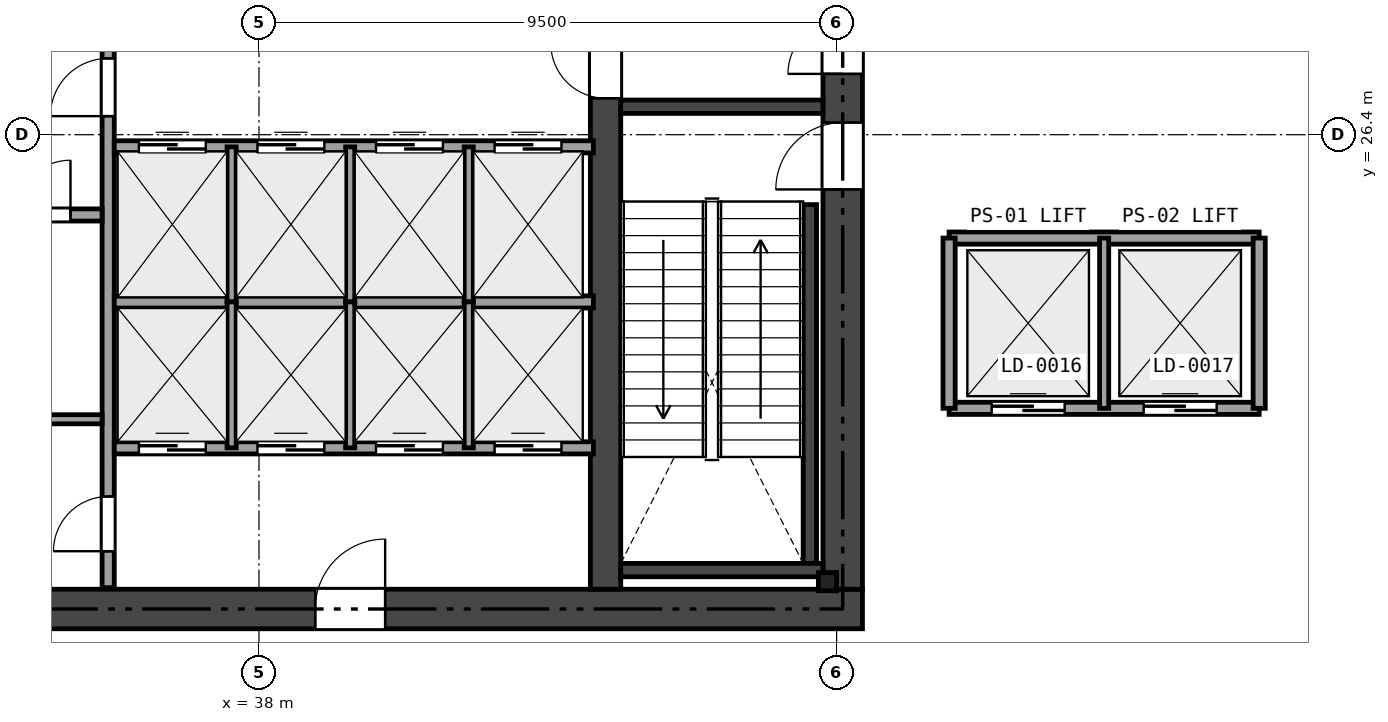
"""IFC4 building model, lengths in metres.
Left out: names, types, materials, properties, quantities, classifications, styles, units other than length and angle.
Written with IfcOpenShell. Run it as: python <this file> out.ifc"""

import sys

from ifc_helpers import new_model, si_unit, direction, frame, frame_2d, origin, origin_2d, place, context, subcontext, project, spatial, rectangle, i_section, extrude, element, fill, save


model = new_model("IFC4")
c1 = context("Model", 3, precision=1e-05, world=origin(), true_north=direction((0.0, 1.0)))
c2 = subcontext(c1, "Body", "Model", "MODEL_VIEW")
j1 = project(units=[si_unit("LENGTHUNIT", "METRE"), si_unit("PLANEANGLEUNIT", "RADIAN")], contexts=[c1])
p1 = place(None, origin())
s1 = spatial("IfcSite", under=j1, at=p1, CompositionType="ELEMENT")
p2 = place(p1, origin())
s2 = spatial("IfcBuilding", under=s1, at=p2, CompositionType="ELEMENT")
p3 = place(p2, origin())
s3 = spatial("IfcBuildingStorey", under=s2, at=p3, CompositionType="ELEMENT", Elevation=0.0)
p4 = place(p3, frame((26.475, 18.6, 0.0), z_axis=(0.0, 0.0, 1.0), x_axis=(1.0, 0.0, 0.0)))
e1 = element("IfcWall", 1, at=p4, inside=s3, PredefinedType="SHEAR", context=c2, shape_type="SweptSolid", body=[
    extrude(rectangle(XDim=21.45, YDim=0.65, at=frame_2d((10.725, 0.0))), origin(), (0.0, 0.0, 1.0), 5.05),
])
p5 = place(p4, frame((12.45, 0.0, 0.0)))
e2 = element("IfcOpeningElement", 2, at=p5, cuts=e1, PredefinedType="OPENING", context=c2, shape_type="SweptSolid", body=[
    extrude(rectangle(XDim=1.15, YDim=2.15, at=frame_2d((0.575, 1.075))), frame((0.0, 0.335, 0.0), z_axis=(0.0, -1.0, 0.0), x_axis=(1.0, 0.0, 0.0)), (0.0, 0.0, 1.0), 0.67),
])
p6 = place(p4, frame((5.275, 0.0, 0.0)))
e3 = element("IfcOpeningElement", 3, at=p6, cuts=e1, PredefinedType="OPENING", context=c2, shape_type="SweptSolid", body=[
    extrude(rectangle(XDim=0.9, YDim=2.1, at=frame_2d((0.45, 1.05))), frame((0.0, 0.335, 0.0), z_axis=(0.0, -1.0, 0.0), x_axis=(1.0, 0.0, 0.0)), (0.0, 0.0, 1.0), 0.67),
])
p7 = place(p3, frame((47.6, 18.925, 0.0), z_axis=(0.0, 0.0, 1.0), x_axis=(0.0, 1.0, 0.0)))
e4 = element("IfcWall", 4, at=p7, inside=s3, PredefinedType="SHEAR", context=c2, shape_type="SweptSolid", body=[
    extrude(rectangle(XDim=14.95, YDim=0.65, at=frame_2d((7.475, 0.0))), origin(), (0.0, 0.0, 1.0), 5.05),
])
p8 = place(p7, frame((6.575, 0.0, 0.0)))
e5 = element("IfcOpeningElement", 5, at=p8, cuts=e4, PredefinedType="OPENING", context=c2, shape_type="SweptSolid", body=[
    extrude(rectangle(XDim=1.1, YDim=2.15, at=frame_2d((0.55, 1.075))), frame((0.0, 0.335, 0.0), z_axis=(0.0, -1.0, 0.0), x_axis=(1.0, 0.0, 0.0)), (0.0, 0.0, 1.0), 0.67),
])
p9 = place(p7, frame((8.475, 0.0, 0.0)))
e6 = element("IfcOpeningElement", 6, at=p9, cuts=e4, PredefinedType="OPENING", context=c2, shape_type="SweptSolid", body=[
    extrude(rectangle(XDim=0.9, YDim=2.1, at=frame_2d((0.45, 1.05))), frame((0.0, 0.335, 0.0), z_axis=(0.0, -1.0, 0.0), x_axis=(1.0, 0.0, 0.0)), (0.0, 0.0, 1.0), 0.67),
])
p10 = place(p7, frame((13.125, 0.0, 0.0)))
e7 = element("IfcOpeningElement", 7, at=p10, cuts=e4, PredefinedType="OPENING", context=c2, shape_type="SweptSolid", body=[
    extrude(rectangle(XDim=0.9, YDim=2.1, at=frame_2d((0.45, 1.05))), frame((0.0, 0.335, 0.0), z_axis=(0.0, -1.0, 0.0), x_axis=(1.0, 0.0, 0.0)), (0.0, 0.0, 1.0), 0.67),
])
p11 = place(p3, frame((43.7, 18.925, 0.0), z_axis=(0.0, 0.0, 1.0), x_axis=(0.0, 1.0, 0.0)))
e8 = element("IfcWall", 8, at=p11, inside=s3, PredefinedType="SHEAR", context=c2, shape_type="SweptSolid", body=[
    extrude(rectangle(XDim=14.95, YDim=0.5, at=frame_2d((7.475, 0.0))), origin(), (0.0, 0.0, 1.0), 5.05),
])
p12 = place(p11, frame((8.075, 0.0, 0.0)))
e9 = element("IfcOpeningElement", 9, at=p12, cuts=e8, PredefinedType="OPENING", context=c2, shape_type="SweptSolid", body=[
    extrude(rectangle(XDim=0.9, YDim=2.1, at=frame_2d((0.45, 1.05))), frame((0.0, 0.26, 0.0), z_axis=(0.0, -1.0, 0.0), x_axis=(1.0, 0.0, 0.0)), (0.0, 0.0, 1.0), 0.52),
])
p13 = place(p3, frame((43.95, 26.86, 0.0), z_axis=(0.0, 0.0, 1.0), x_axis=(1.0, 0.0, 0.0)))
e10 = element("IfcWall", 10, at=p13, inside=s3, PredefinedType="SHEAR", context=c2, shape_type="SweptSolid", body=[
    extrude(rectangle(XDim=3.325, YDim=0.22, at=frame_2d((1.663, 0.0))), origin(), (0.0, 0.0, 1.0), 5.05),
])
p14 = place(p3, frame((47.06, 19.35, 0.0), z_axis=(0.0, 0.0, 1.0), x_axis=(0.0, 1.0, 0.0)))
e11 = element("IfcWall", 11, at=p14, inside=s3, PredefinedType="SHEAR", context=c2, shape_type="SweptSolid", body=[
    extrude(rectangle(XDim=5.9, YDim=0.22, at=frame_2d((2.95, 0.0))), origin(), (0.0, 0.0, 1.0), 5.05),
])
p15 = place(p3, frame((43.95, 19.24, 0.0), z_axis=(0.0, 0.0, 1.0), x_axis=(1.0, 0.0, 0.0)))
e12 = element("IfcWall", 12, at=p15, inside=s3, PredefinedType="SHEAR", context=c2, shape_type="SweptSolid", body=[
    extrude(rectangle(XDim=3.325, YDim=0.22, at=frame_2d((1.663, 0.0))), origin(), (0.0, 0.0, 1.0), 5.05),
])
p16 = place(p3, frame((47.35, 19.05, 0.0), z_axis=(0.0, 0.0, 1.0), x_axis=(1.0, 0.0, 0.0)))
e13 = element("IfcColumn", 13, at=p16, inside=s3, PredefinedType="PILASTER", context=c2, shape_type="SweptSolid", body=[
    extrude(i_section(OverallWidth=0.3, OverallDepth=0.3, WebThickness=0.011, FlangeThickness=0.019, at=origin_2d()), origin(), (0.0, 0.0, 1.0), 5.05),
])
p17 = place(p3, frame((35.52, 18.95, 0.0), z_axis=(0.0, 0.0, 1.0), x_axis=(0.0, 1.0, 0.0)))
e14 = element("IfcWall", 14, at=p17, inside=s3, PredefinedType="SOLIDWALL", context=c2, shape_type="SweptSolid", body=[
    extrude(rectangle(XDim=14.9, YDim=0.2, at=frame_2d((7.45, 0.0))), origin(), (0.0, 0.0, 1.0), 4.571),
])
p18 = place(p17, frame((7.755, 0.0, 0.0)))
e15 = element("IfcOpeningElement", 15, at=p18, cuts=e14, PredefinedType="OPENING", context=c2, shape_type="SweptSolid", body=[
    extrude(rectangle(XDim=0.95, YDim=2.15, at=frame_2d((0.475, 1.075))), frame((0.0, 0.11, 0.0), z_axis=(0.0, -1.0, 0.0), x_axis=(1.0, 0.0, 0.0)), (0.0, 0.0, 1.0), 0.22),
])
p19 = place(p17, frame((0.6, 0.0, 0.0)))
e16 = element("IfcOpeningElement", 16, at=p19, cuts=e14, PredefinedType="OPENING", context=c2, shape_type="SweptSolid", body=[
    extrude(rectangle(XDim=0.9, YDim=2.1, at=frame_2d((0.45, 1.05))), frame((0.0, 0.11, 0.0), z_axis=(0.0, -1.0, 0.0), x_axis=(1.0, 0.0, 0.0)), (0.0, 0.0, 1.0), 0.22),
])
p20 = place(p3, frame((31.0, 25.08, 0.0), z_axis=(0.0, 0.0, 1.0), x_axis=(1.0, 0.0, 0.0)))
e17 = element("IfcWall", 17, at=p20, inside=s3, PredefinedType="SOLIDWALL", context=c2, shape_type="SweptSolid", body=[
    extrude(rectangle(XDim=4.42, YDim=0.2, at=frame_2d((2.21, 0.0))), origin(), (0.0, 0.0, 1.0), 5.05),
])
p21 = place(p20, frame((3.0, 0.0, 0.0)))
e18 = element("IfcOpeningElement", 18, at=p21, cuts=e17, PredefinedType="OPENING", context=c2, shape_type="SweptSolid", body=[
    extrude(rectangle(XDim=0.9, YDim=2.1, at=frame_2d((0.45, 1.05))), frame((0.0, 0.11, 0.0), z_axis=(0.0, -1.0, 0.0), x_axis=(1.0, 0.0, 0.0)), (0.0, 0.0, 1.0), 0.22),
])
p22 = place(p20, frame((0.62, 0.0, 0.0)))
e19 = element("IfcOpeningElement", 19, at=p22, cuts=e17, PredefinedType="OPENING", context=c2, shape_type="SweptSolid", body=[
    extrude(rectangle(XDim=1.2, YDim=2.15, at=frame_2d((0.6, 1.075))), frame((0.0, 0.11, 0.0), z_axis=(0.0, -1.0, 0.0), x_axis=(1.0, 0.0, 0.0)), (0.0, 0.0, 1.0), 0.22),
])
p23 = place(p3, frame((33.42, 21.72, 0.0), z_axis=(0.0, 0.0, 1.0), x_axis=(1.0, 0.0, 0.0)))
e20 = element("IfcWall", 20, at=p23, inside=s3, PredefinedType="PARTITIONING", context=c2, shape_type="SweptSolid", body=[
    extrude(rectangle(XDim=2.0, YDim=0.15, at=frame_2d((1.0, 0.0))), origin(), (0.0, 0.0, 1.0), 5.05),
])
p24 = place(p3, frame((35.62, 26.2, 0.0), z_axis=(0.0, 0.0, 1.0), x_axis=(1.0, 0.0, 0.0)))
e21 = element("IfcWall", 21, at=p24, inside=s3, PredefinedType="SOLIDWALL", context=c2, shape_type="SweptSolid", body=[
    extrude(rectangle(XDim=7.88, YDim=0.2, at=frame_2d((3.94, 0.0))), origin(), (0.0, 0.0, 1.0), 5.05),
])
p25 = place(p24, frame((0.405, 0.0, 0.0)))
e22 = element("IfcOpeningElement", 22, at=p25, cuts=e21, PredefinedType="OPENING", context=c2, shape_type="SweptSolid", body=[
    extrude(rectangle(XDim=1.1, YDim=2.15, at=frame_2d((0.55, 1.075))), frame((0.0, 0.11, 0.0), z_axis=(0.0, -1.0, 0.0), x_axis=(1.0, 0.0, 0.0)), (0.0, 0.0, 1.0), 0.22),
])
p26 = place(p24, frame((2.355, 0.0, 0.0)))
e23 = element("IfcOpeningElement", 23, at=p26, cuts=e21, PredefinedType="OPENING", context=c2, shape_type="SweptSolid", body=[
    extrude(rectangle(XDim=1.1, YDim=2.15, at=frame_2d((0.55, 1.075))), frame((0.0, 0.11, 0.0), z_axis=(0.0, -1.0, 0.0), x_axis=(1.0, 0.0, 0.0)), (0.0, 0.0, 1.0), 0.22),
])
p27 = place(p24, frame((4.305, 0.0, 0.0)))
e24 = element("IfcOpeningElement", 24, at=p27, cuts=e21, PredefinedType="OPENING", context=c2, shape_type="SweptSolid", body=[
    extrude(rectangle(XDim=1.1, YDim=2.15, at=frame_2d((0.55, 1.075))), frame((0.0, 0.11, 0.0), z_axis=(0.0, -1.0, 0.0), x_axis=(1.0, 0.0, 0.0)), (0.0, 0.0, 1.0), 0.22),
])
p28 = place(p24, frame((6.255, 0.0, 0.0)))
e25 = element("IfcOpeningElement", 25, at=p28, cuts=e21, PredefinedType="OPENING", context=c2, shape_type="SweptSolid", body=[
    extrude(rectangle(XDim=1.1, YDim=2.15, at=frame_2d((0.55, 1.075))), frame((0.0, 0.11, 0.0), z_axis=(0.0, -1.0, 0.0), x_axis=(1.0, 0.0, 0.0)), (0.0, 0.0, 1.0), 0.22),
])
p29 = place(p3, frame((35.62, 23.65, 0.0), z_axis=(0.0, 0.0, 1.0), x_axis=(1.0, 0.0, 0.0)))
e26 = element("IfcWall", 26, at=p29, inside=s3, PredefinedType="SOLIDWALL", context=c2, shape_type="SweptSolid", body=[
    extrude(rectangle(XDim=7.88, YDim=0.2, at=frame_2d((3.94, 0.0))), origin(), (0.0, 0.0, 1.0), 4.571),
])
p30 = place(p3, frame((35.62, 21.25, 0.0), z_axis=(0.0, 0.0, 1.0), x_axis=(1.0, 0.0, 0.0)))
e27 = element("IfcWall", 27, at=p30, inside=s3, PredefinedType="SOLIDWALL", context=c2, shape_type="SweptSolid", body=[
    extrude(rectangle(XDim=7.88, YDim=0.2, at=frame_2d((3.94, 0.0))), origin(), (0.0, 0.0, 1.0), 5.05),
])
p31 = place(p30, frame((0.405, 0.0, 0.0)))
e28 = element("IfcOpeningElement", 28, at=p31, cuts=e27, PredefinedType="OPENING", context=c2, shape_type="SweptSolid", body=[
    extrude(rectangle(XDim=1.1, YDim=2.15, at=frame_2d((0.55, 1.075))), frame((0.0, 0.11, 0.0), z_axis=(0.0, -1.0, 0.0), x_axis=(1.0, 0.0, 0.0)), (0.0, 0.0, 1.0), 0.22),
])
p32 = place(p30, frame((2.355, 0.0, 0.0)))
e29 = element("IfcOpeningElement", 29, at=p32, cuts=e27, PredefinedType="OPENING", context=c2, shape_type="SweptSolid", body=[
    extrude(rectangle(XDim=1.1, YDim=2.15, at=frame_2d((0.55, 1.075))), frame((0.0, 0.11, 0.0), z_axis=(0.0, -1.0, 0.0), x_axis=(1.0, 0.0, 0.0)), (0.0, 0.0, 1.0), 0.22),
])
p33 = place(p30, frame((4.305, 0.0, 0.0)))
e30 = element("IfcOpeningElement", 30, at=p33, cuts=e27, PredefinedType="OPENING", context=c2, shape_type="SweptSolid", body=[
    extrude(rectangle(XDim=1.1, YDim=2.15, at=frame_2d((0.55, 1.075))), frame((0.0, 0.11, 0.0), z_axis=(0.0, -1.0, 0.0), x_axis=(1.0, 0.0, 0.0)), (0.0, 0.0, 1.0), 0.22),
])
p34 = place(p30, frame((6.255, 0.0, 0.0)))
e31 = element("IfcOpeningElement", 31, at=p34, cuts=e27, PredefinedType="OPENING", context=c2, shape_type="SweptSolid", body=[
    extrude(rectangle(XDim=1.1, YDim=2.15, at=frame_2d((0.55, 1.075))), frame((0.0, 0.11, 0.0), z_axis=(0.0, -1.0, 0.0), x_axis=(1.0, 0.0, 0.0)), (0.0, 0.0, 1.0), 0.22),
])
for number, where, z_axis, x_axis in (
    (32, (37.55, 23.65, 0.0), (0.0, 0.0, 1.0), (0.0, 1.0, 0.0)),
    (33, (39.5, 23.65, 0.0), (0.0, 0.0, 1.0), (0.0, 1.0, 0.0)),
    (34, (41.45, 23.65, 0.0), (0.0, 0.0, 1.0), (0.0, 1.0, 0.0)),
):
    element("IfcWall", number, at=place(p3, frame(where, z_axis=z_axis, x_axis=x_axis)), inside=s3, PredefinedType="PARTITIONING", context=c2, shape_type="SweptSolid", body=[
        extrude(rectangle(XDim=2.55, YDim=0.15, at=frame_2d((1.275, 0.0))), origin(), (0.0, 0.0, 1.0), 4.571),
    ])
for number, where, z_axis, x_axis in (
    (35, (37.55, 21.25, 0.0), (0.0, 0.0, 1.0), (0.0, 1.0, 0.0)),
    (36, (39.5, 21.25, 0.0), (0.0, 0.0, 1.0), (0.0, 1.0, 0.0)),
    (37, (41.45, 21.25, 0.0), (0.0, 0.0, 1.0), (0.0, 1.0, 0.0)),
):
    element("IfcWall", number, at=place(p3, frame(where, z_axis=z_axis, x_axis=x_axis)), inside=s3, PredefinedType="PARTITIONING", context=c2, shape_type="SweptSolid", body=[
        extrude(rectangle(XDim=2.4, YDim=0.15, at=frame_2d((1.2, 0.0))), origin(), (0.0, 0.0, 1.0), 4.571),
    ])
p35 = place(p3, frame((49.35, 24.7, 0.0), z_axis=(0.0, 0.0, 1.0), x_axis=(1.0, 0.0, 0.0)))
e38 = element("IfcWall", 38, at=p35, inside=s3, PredefinedType="SOLIDWALL", context=c2, shape_type="SweptSolid", body=[
    extrude(rectangle(XDim=5.1, YDim=0.2, at=frame_2d((2.55, 0.0))), origin(), (0.0, 0.0, 1.0), 5.05),
])
p36 = place(p3, frame((49.35, 21.9, 0.0), z_axis=(0.0, 0.0, 1.0), x_axis=(1.0, 0.0, 0.0)))
e39 = element("IfcWall", 39, at=p36, inside=s3, PredefinedType="SOLIDWALL", context=c2, shape_type="SweptSolid", body=[
    extrude(rectangle(XDim=5.1, YDim=0.2, at=frame_2d((2.55, 0.0))), origin(), (0.0, 0.0, 1.0), 5.05),
])
p37 = place(p36, frame((0.7, 0.0, 0.0)))
e40 = element("IfcOpeningElement", 40, at=p37, cuts=e39, PredefinedType="OPENING", context=c2, shape_type="SweptSolid", body=[
    extrude(rectangle(XDim=1.2, YDim=2.15, at=frame_2d((0.6, 1.075))), frame((0.0, 0.11, 0.0), z_axis=(0.0, -1.0, 0.0), x_axis=(1.0, 0.0, 0.0)), (0.0, 0.0, 1.0), 0.22),
])
p38 = place(p36, frame((3.2, 0.0, 0.0)))
e41 = element("IfcOpeningElement", 41, at=p38, cuts=e39, PredefinedType="OPENING", context=c2, shape_type="SweptSolid", body=[
    extrude(rectangle(XDim=1.2, YDim=2.15, at=frame_2d((0.6, 1.075))), frame((0.0, 0.11, 0.0), z_axis=(0.0, -1.0, 0.0), x_axis=(1.0, 0.0, 0.0)), (0.0, 0.0, 1.0), 0.22),
])
for number, where, z_axis, x_axis in (
    (42, (49.35, 21.9, 0.0), (0.0, 0.0, 1.0), (0.0, 1.0, 0.0)),
    (43, (54.45, 21.9, 0.0), (0.0, 0.0, 1.0), (0.0, 1.0, 0.0)),
):
    element("IfcWall", number, at=place(p3, frame(where, z_axis=z_axis, x_axis=x_axis)), inside=s3, PredefinedType="SOLIDWALL", context=c2, shape_type="SweptSolid", body=[
        extrude(rectangle(XDim=2.8, YDim=0.2, at=frame_2d((1.4, 0.0))), origin(), (0.0, 0.0, 1.0), 5.05),
    ])
p39 = place(p3, frame((51.9, 21.9, 0.0), z_axis=(0.0, 0.0, 1.0), x_axis=(0.0, 1.0, 0.0)))
e44 = element("IfcWall", 44, at=p39, inside=s3, PredefinedType="PARTITIONING", context=c2, shape_type="SweptSolid", body=[
    extrude(rectangle(XDim=2.8, YDim=0.15, at=frame_2d((1.4, 0.0))), origin(), (0.0, 0.0, 1.0), 5.05),
])
p40 = place(p8, origin())
e45 = element("IfcDoor", 45, at=p40, inside=s3, OperationType="SINGLE_SWING_LEFT", PredefinedType="DOOR", context=c2, shape_type="SweptSolid", body=[
    extrude(rectangle(XDim=1.1, YDim=2.15, at=frame_2d((0.55, 1.075))), frame((0.0, 0.025, 0.0), z_axis=(0.0, -1.0, 0.0), x_axis=(1.0, 0.0, 0.0)), (0.0, 0.0, 1.0), 0.05),
])
fill(e5, e45)
p41 = place(p18, origin())
e46 = element("IfcDoor", 46, at=p41, inside=s3, OperationType="SINGLE_SWING_LEFT", PredefinedType="DOOR", context=c2, shape_type="SweptSolid", body=[
    extrude(rectangle(XDim=0.95, YDim=2.15, at=frame_2d((0.475, 1.075))), frame((0.0, 0.025, 0.0), z_axis=(0.0, -1.0, 0.0), x_axis=(1.0, 0.0, 0.0)), (0.0, 0.0, 1.0), 0.05),
])
fill(e15, e46)
p42 = place(p12, origin())
e47 = element("IfcDoor", 47, at=p42, inside=s3, OperationType="SINGLE_SWING_RIGHT", PredefinedType="DOOR", context=c2, shape_type="SweptSolid", body=[
    extrude(rectangle(XDim=0.9, YDim=2.1, at=frame_2d((0.45, 1.05))), frame((0.0, 0.025, 0.0), z_axis=(0.0, -1.0, 0.0), x_axis=(1.0, 0.0, 0.0)), (0.0, 0.0, 1.0), 0.05),
])
fill(e9, e47)
p43 = place(p9, origin())
e48 = element("IfcDoor", 48, at=p43, inside=s3, OperationType="SINGLE_SWING_LEFT", PredefinedType="DOOR", context=c2, shape_type="SweptSolid", body=[
    extrude(rectangle(XDim=0.9, YDim=2.1, at=frame_2d((0.45, 1.05))), frame((0.0, 0.025, 0.0), z_axis=(0.0, -1.0, 0.0), x_axis=(1.0, 0.0, 0.0)), (0.0, 0.0, 1.0), 0.05),
])
fill(e6, e48)
p44 = place(p5, origin())
e49 = element("IfcDoor", 49, at=p44, inside=s3, OperationType="SINGLE_SWING_RIGHT", PredefinedType="DOOR", context=c2, shape_type="SweptSolid", body=[
    extrude(rectangle(XDim=1.15, YDim=2.15, at=frame_2d((0.575, 1.075))), frame((0.0, 0.025, 0.0), z_axis=(0.0, -1.0, 0.0), x_axis=(1.0, 0.0, 0.0)), (0.0, 0.0, 1.0), 0.05),
])
fill(e2, e49)
p45 = place(p19, origin())
e50 = element("IfcDoor", 50, at=p45, inside=s3, OperationType="SINGLE_SWING_LEFT", PredefinedType="DOOR", context=c2, shape_type="SweptSolid", body=[
    extrude(rectangle(XDim=0.9, YDim=2.1, at=frame_2d((0.45, 1.05))), frame((0.0, 0.025, 0.0), z_axis=(0.0, -1.0, 0.0), x_axis=(1.0, 0.0, 0.0)), (0.0, 0.0, 1.0), 0.05),
])
fill(e16, e50)
p46 = place(p21, origin())
e51 = element("IfcDoor", 51, at=p46, inside=s3, OperationType="SINGLE_SWING_RIGHT", PredefinedType="DOOR", context=c2, shape_type="SweptSolid", body=[
    extrude(rectangle(XDim=0.9, YDim=2.1, at=frame_2d((0.45, 1.05))), frame((0.0, 0.025, 0.0), z_axis=(0.0, -1.0, 0.0), x_axis=(1.0, 0.0, 0.0)), (0.0, 0.0, 1.0), 0.05),
])
fill(e18, e51)
p47 = place(p31, origin())
e52 = element("IfcDoor", 52, at=p47, inside=s3, OperationType="SLIDING_TO_LEFT", PredefinedType="DOOR", context=c2, shape_type="SweptSolid", body=[
    extrude(rectangle(XDim=1.1, YDim=2.15, at=frame_2d((0.55, 1.075))), frame((0.0, 0.025, 0.0), z_axis=(0.0, -1.0, 0.0), x_axis=(1.0, 0.0, 0.0)), (0.0, 0.0, 1.0), 0.05),
])
fill(e28, e52)
p48 = place(p25, origin())
e53 = element("IfcDoor", 53, at=p48, inside=s3, OperationType="SLIDING_TO_LEFT", PredefinedType="DOOR", context=c2, shape_type="SweptSolid", body=[
    extrude(rectangle(XDim=1.1, YDim=2.15, at=frame_2d((0.55, 1.075))), frame((0.0, 0.025, 0.0), z_axis=(0.0, -1.0, 0.0), x_axis=(1.0, 0.0, 0.0)), (0.0, 0.0, 1.0), 0.05),
])
fill(e22, e53)
p49 = place(p32, origin())
e54 = element("IfcDoor", 54, at=p49, inside=s3, OperationType="SLIDING_TO_LEFT", PredefinedType="DOOR", context=c2, shape_type="SweptSolid", body=[
    extrude(rectangle(XDim=1.1, YDim=2.15, at=frame_2d((0.55, 1.075))), frame((0.0, 0.025, 0.0), z_axis=(0.0, -1.0, 0.0), x_axis=(1.0, 0.0, 0.0)), (0.0, 0.0, 1.0), 0.05),
])
fill(e29, e54)
p50 = place(p26, origin())
e55 = element("IfcDoor", 55, at=p50, inside=s3, OperationType="SLIDING_TO_LEFT", PredefinedType="DOOR", context=c2, shape_type="SweptSolid", body=[
    extrude(rectangle(XDim=1.1, YDim=2.15, at=frame_2d((0.55, 1.075))), frame((0.0, 0.025, 0.0), z_axis=(0.0, -1.0, 0.0), x_axis=(1.0, 0.0, 0.0)), (0.0, 0.0, 1.0), 0.05),
])
fill(e23, e55)
p51 = place(p33, origin())
e56 = element("IfcDoor", 56, at=p51, inside=s3, OperationType="SLIDING_TO_LEFT", PredefinedType="DOOR", context=c2, shape_type="SweptSolid", body=[
    extrude(rectangle(XDim=1.1, YDim=2.15, at=frame_2d((0.55, 1.075))), frame((0.0, 0.025, 0.0), z_axis=(0.0, -1.0, 0.0), x_axis=(1.0, 0.0, 0.0)), (0.0, 0.0, 1.0), 0.05),
])
fill(e30, e56)
p52 = place(p27, origin())
e57 = element("IfcDoor", 57, at=p52, inside=s3, OperationType="SLIDING_TO_LEFT", PredefinedType="DOOR", context=c2, shape_type="SweptSolid", body=[
    extrude(rectangle(XDim=1.1, YDim=2.15, at=frame_2d((0.55, 1.075))), frame((0.0, 0.025, 0.0), z_axis=(0.0, -1.0, 0.0), x_axis=(1.0, 0.0, 0.0)), (0.0, 0.0, 1.0), 0.05),
])
fill(e24, e57)
p53 = place(p34, origin())
e58 = element("IfcDoor", 58, at=p53, inside=s3, OperationType="SLIDING_TO_LEFT", PredefinedType="DOOR", context=c2, shape_type="SweptSolid", body=[
    extrude(rectangle(XDim=1.1, YDim=2.15, at=frame_2d((0.55, 1.075))), frame((0.0, 0.025, 0.0), z_axis=(0.0, -1.0, 0.0), x_axis=(1.0, 0.0, 0.0)), (0.0, 0.0, 1.0), 0.05),
])
fill(e31, e58)
p54 = place(p28, origin())
e59 = element("IfcDoor", 59, at=p54, inside=s3, OperationType="SLIDING_TO_LEFT", PredefinedType="DOOR", context=c2, shape_type="SweptSolid", body=[
    extrude(rectangle(XDim=1.1, YDim=2.15, at=frame_2d((0.55, 1.075))), frame((0.0, 0.025, 0.0), z_axis=(0.0, -1.0, 0.0), x_axis=(1.0, 0.0, 0.0)), (0.0, 0.0, 1.0), 0.05),
])
fill(e25, e59)
p55 = place(p37, origin())
e60 = element("IfcDoor", 60, at=p55, inside=s3, OperationType="SLIDING_TO_LEFT", PredefinedType="DOOR", context=c2, shape_type="SweptSolid", body=[
    extrude(rectangle(XDim=1.2, YDim=2.15, at=frame_2d((0.6, 1.075))), frame((0.0, 0.025, 0.0), z_axis=(0.0, -1.0, 0.0), x_axis=(1.0, 0.0, 0.0)), (0.0, 0.0, 1.0), 0.05),
])
fill(e40, e60)
p56 = place(p38, origin())
e61 = element("IfcDoor", 61, at=p56, inside=s3, OperationType="SLIDING_TO_LEFT", PredefinedType="DOOR", context=c2, shape_type="SweptSolid", body=[
    extrude(rectangle(XDim=1.2, YDim=2.15, at=frame_2d((0.6, 1.075))), frame((0.0, 0.025, 0.0), z_axis=(0.0, -1.0, 0.0), x_axis=(1.0, 0.0, 0.0)), (0.0, 0.0, 1.0), 0.05),
])
fill(e41, e61)
save(model, sys.argv[1])
